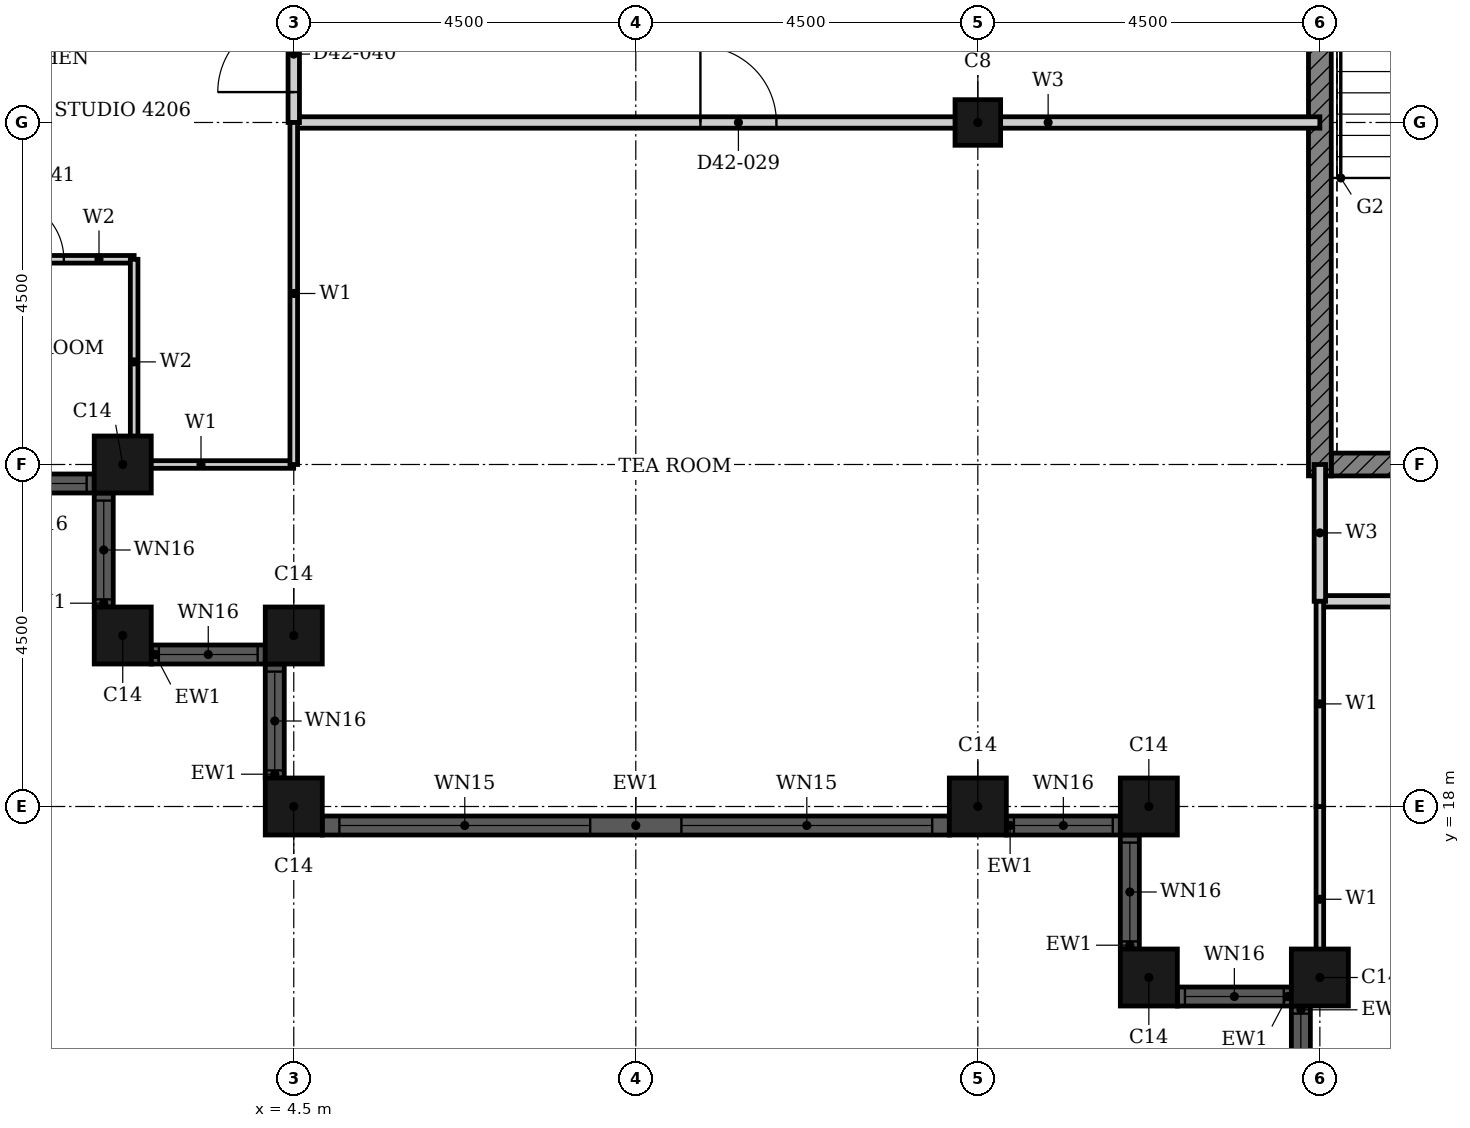
"""IFC4 building model, lengths in metres.
Left out: names, types, materials, properties, quantities, classifications, styles, units other than length and angle.
Written with IfcOpenShell. Run it as: python <this file> out.ifc"""

import sys

from ifc_helpers import new_model, si_unit, direction, frame, frame_2d, origin, origin_2d, place, context, subcontext, project, spatial, rectangle, hollow_rectangle, extrude, element, fill, save


model = new_model("IFC4")
c1 = context("Model", 3, precision=1e-05, world=origin(), true_north=direction((0.0, 1.0)))
c2 = subcontext(c1, "Body", "Model", "MODEL_VIEW")
j1 = project(units=[si_unit("LENGTHUNIT", "METRE"), si_unit("PLANEANGLEUNIT", "RADIAN")], contexts=[c1])
p1 = place(None, origin())
s1 = spatial("IfcSite", under=j1, at=p1, CompositionType="ELEMENT")
p2 = place(p1, origin())
s2 = spatial("IfcBuilding", under=s1, at=p2, CompositionType="ELEMENT")
p3 = place(p2, frame((0.0, 0.0, 169.1)))
s3 = spatial("IfcBuildingStorey", under=s2, at=p3, CompositionType="ELEMENT", Elevation=169.1)
for number, where, z_axis, x_axis in (
    (1, (2.25, 22.5, 0.0), (0.0, 0.0, 1.0), (1.0, 0.0, 0.0)),
    (2, (2.25, 20.25, 0.0), (0.0, 0.0, 1.0), (1.0, 0.0, 0.0)),
    (3, (4.5, 20.25, 0.0), (0.0, 0.0, 1.0), (1.0, 0.0, 0.0)),
    (4, (4.5, 18.0, 0.0), (0.0, 0.0, 1.0), (1.0, 0.0, 0.0)),
    (5, (13.5, 18.0, 0.0), (0.0, 0.0, 1.0), (1.0, 0.0, 0.0)),
    (6, (15.75, 18.0, 0.0), (0.0, 0.0, 1.0), (1.0, 0.0, 0.0)),
    (7, (15.75, 15.75, 0.0), (0.0, 0.0, 1.0), (1.0, 0.0, 0.0)),
    (8, (18.0, 15.75, 0.0), (0.0, 0.0, 1.0), (1.0, 0.0, 0.0)),
):
    element("IfcColumn", number, at=place(p3, frame(where, z_axis=z_axis, x_axis=x_axis)), inside=s3, PredefinedType="COLUMN", context=c2, shape_type="SweptSolid", body=[
        extrude(hollow_rectangle(XDim=0.75, YDim=0.75, WallThickness=0.024, at=origin_2d()), origin(), (0.0, 0.0, 1.0), 3.7),
    ])
p4 = place(p3, frame((13.5, 27.0, 0.0), z_axis=(0.0, 0.0, 1.0), x_axis=(1.0, 0.0, 0.0)))
e9 = element("IfcColumn", 9, at=p4, inside=s3, PredefinedType="COLUMN", context=c2, shape_type="SweptSolid", body=[
    extrude(hollow_rectangle(XDim=0.6, YDim=0.6, WallThickness=0.02, at=origin_2d()), origin(), (0.0, 0.0, 1.0), 3.7),
])
p5 = place(p3, frame((0.375, 22.25, 0.0), z_axis=(0.0, 0.0, 1.0), x_axis=(1.0, 0.0, 0.0)))
e10 = element("IfcWall", 10, at=p5, inside=s3, PredefinedType="SOLIDWALL", context=c2, shape_type="SweptSolid", body=[
    extrude(rectangle(XDim=1.5, YDim=0.25, at=frame_2d((0.75, 0.0))), origin(), (0.0, 0.0, 1.0), 3.7),
])
p6 = place(p5, frame((0.1, 0.0, 0.9)))
e11 = element("IfcOpeningElement", 11, at=p6, cuts=e10, PredefinedType="OPENING", context=c2, shape_type="SweptSolid", body=[
    extrude(rectangle(XDim=1.3, YDim=1.85, at=frame_2d((0.65, 0.925))), frame((0.0, 0.135, 0.0), z_axis=(0.0, -1.0, 0.0), x_axis=(1.0, 0.0, 0.0)), (0.0, 0.0, 1.0), 0.27),
])
p7 = place(p3, frame((2.0, 22.125, 0.0), z_axis=(0.0, 0.0, 1.0), x_axis=(0.0, -1.0, 0.0)))
e12 = element("IfcWall", 12, at=p7, inside=s3, PredefinedType="SOLIDWALL", context=c2, shape_type="SweptSolid", body=[
    extrude(rectangle(XDim=1.5, YDim=0.25, at=frame_2d((0.75, 0.0))), origin(), (0.0, 0.0, 1.0), 3.7),
])
p8 = place(p7, frame((0.1, 0.0, 0.9)))
e13 = element("IfcOpeningElement", 13, at=p8, cuts=e12, PredefinedType="OPENING", context=c2, shape_type="SweptSolid", body=[
    extrude(rectangle(XDim=1.3, YDim=1.85, at=frame_2d((0.65, 0.925))), frame((0.0, 0.135, 0.0), z_axis=(0.0, -1.0, 0.0), x_axis=(1.0, 0.0, 0.0)), (0.0, 0.0, 1.0), 0.27),
])
p9 = place(p3, frame((2.625, 20.0, 0.0), z_axis=(0.0, 0.0, 1.0), x_axis=(1.0, 0.0, 0.0)))
e14 = element("IfcWall", 14, at=p9, inside=s3, PredefinedType="SOLIDWALL", context=c2, shape_type="SweptSolid", body=[
    extrude(rectangle(XDim=1.5, YDim=0.25, at=frame_2d((0.75, 0.0))), origin(), (0.0, 0.0, 1.0), 3.7),
])
p10 = place(p9, frame((0.1, 0.0, 0.9)))
e15 = element("IfcOpeningElement", 15, at=p10, cuts=e14, PredefinedType="OPENING", context=c2, shape_type="SweptSolid", body=[
    extrude(rectangle(XDim=1.3, YDim=1.85, at=frame_2d((0.65, 0.925))), frame((0.0, 0.135, 0.0), z_axis=(0.0, -1.0, 0.0), x_axis=(1.0, 0.0, 0.0)), (0.0, 0.0, 1.0), 0.27),
])
p11 = place(p3, frame((4.25, 19.875, 0.0), z_axis=(0.0, 0.0, 1.0), x_axis=(0.0, -1.0, 0.0)))
e16 = element("IfcWall", 16, at=p11, inside=s3, PredefinedType="SOLIDWALL", context=c2, shape_type="SweptSolid", body=[
    extrude(rectangle(XDim=1.5, YDim=0.25, at=frame_2d((0.75, 0.0))), origin(), (0.0, 0.0, 1.0), 3.7),
])
p12 = place(p11, frame((0.1, 0.0, 0.9)))
e17 = element("IfcOpeningElement", 17, at=p12, cuts=e16, PredefinedType="OPENING", context=c2, shape_type="SweptSolid", body=[
    extrude(rectangle(XDim=1.3, YDim=1.85, at=frame_2d((0.65, 0.925))), frame((0.0, 0.135, 0.0), z_axis=(0.0, -1.0, 0.0), x_axis=(1.0, 0.0, 0.0)), (0.0, 0.0, 1.0), 0.27),
])
p13 = place(p3, frame((4.875, 17.75, 0.0), z_axis=(0.0, 0.0, 1.0), x_axis=(1.0, 0.0, 0.0)))
e18 = element("IfcWall", 18, at=p13, inside=s3, PredefinedType="SOLIDWALL", context=c2, shape_type="SweptSolid", body=[
    extrude(rectangle(XDim=8.25, YDim=0.25, at=frame_2d((4.125, 0.0))), origin(), (0.0, 0.0, 1.0), 3.7),
])
p14 = place(p13, frame((0.225, 0.0, 0.45)))
e19 = element("IfcOpeningElement", 19, at=p14, cuts=e18, PredefinedType="OPENING", context=c2, shape_type="SweptSolid", body=[
    extrude(rectangle(XDim=3.3, YDim=2.3, at=frame_2d((1.65, 1.15))), frame((0.0, 0.135, 0.0), z_axis=(0.0, -1.0, 0.0), x_axis=(1.0, 0.0, 0.0)), (0.0, 0.0, 1.0), 0.27),
])
p15 = place(p13, frame((4.725, 0.0, 0.45)))
e20 = element("IfcOpeningElement", 20, at=p15, cuts=e18, PredefinedType="OPENING", context=c2, shape_type="SweptSolid", body=[
    extrude(rectangle(XDim=3.3, YDim=2.3, at=frame_2d((1.65, 1.15))), frame((0.0, 0.135, 0.0), z_axis=(0.0, -1.0, 0.0), x_axis=(1.0, 0.0, 0.0)), (0.0, 0.0, 1.0), 0.27),
])
p16 = place(p3, frame((13.875, 17.75, 0.0), z_axis=(0.0, 0.0, 1.0), x_axis=(1.0, 0.0, 0.0)))
e21 = element("IfcWall", 21, at=p16, inside=s3, PredefinedType="SOLIDWALL", context=c2, shape_type="SweptSolid", body=[
    extrude(rectangle(XDim=1.5, YDim=0.25, at=frame_2d((0.75, 0.0))), origin(), (0.0, 0.0, 1.0), 3.7),
])
p17 = place(p16, frame((0.1, 0.0, 0.9)))
e22 = element("IfcOpeningElement", 22, at=p17, cuts=e21, PredefinedType="OPENING", context=c2, shape_type="SweptSolid", body=[
    extrude(rectangle(XDim=1.3, YDim=1.85, at=frame_2d((0.65, 0.925))), frame((0.0, 0.135, 0.0), z_axis=(0.0, -1.0, 0.0), x_axis=(1.0, 0.0, 0.0)), (0.0, 0.0, 1.0), 0.27),
])
p18 = place(p3, frame((15.5, 17.625, 0.0), z_axis=(0.0, 0.0, 1.0), x_axis=(0.0, -1.0, 0.0)))
e23 = element("IfcWall", 23, at=p18, inside=s3, PredefinedType="SOLIDWALL", context=c2, shape_type="SweptSolid", body=[
    extrude(rectangle(XDim=1.5, YDim=0.25, at=frame_2d((0.75, 0.0))), origin(), (0.0, 0.0, 1.0), 3.7),
])
p19 = place(p18, frame((0.1, 0.0, 0.9)))
e24 = element("IfcOpeningElement", 24, at=p19, cuts=e23, PredefinedType="OPENING", context=c2, shape_type="SweptSolid", body=[
    extrude(rectangle(XDim=1.3, YDim=1.85, at=frame_2d((0.65, 0.925))), frame((0.0, 0.135, 0.0), z_axis=(0.0, -1.0, 0.0), x_axis=(1.0, 0.0, 0.0)), (0.0, 0.0, 1.0), 0.27),
])
p20 = place(p3, frame((16.125, 15.5, 0.0), z_axis=(0.0, 0.0, 1.0), x_axis=(1.0, 0.0, 0.0)))
e25 = element("IfcWall", 25, at=p20, inside=s3, PredefinedType="SOLIDWALL", context=c2, shape_type="SweptSolid", body=[
    extrude(rectangle(XDim=1.5, YDim=0.25, at=frame_2d((0.75, 0.0))), origin(), (0.0, 0.0, 1.0), 3.7),
])
p21 = place(p20, frame((0.1, 0.0, 0.9)))
e26 = element("IfcOpeningElement", 26, at=p21, cuts=e25, PredefinedType="OPENING", context=c2, shape_type="SweptSolid", body=[
    extrude(rectangle(XDim=1.3, YDim=1.85, at=frame_2d((0.65, 0.925))), frame((0.0, 0.135, 0.0), z_axis=(0.0, -1.0, 0.0), x_axis=(1.0, 0.0, 0.0)), (0.0, 0.0, 1.0), 0.27),
])
p22 = place(p3, frame((17.75, 15.375, 0.0), z_axis=(0.0, 0.0, 1.0), x_axis=(0.0, -1.0, 0.0)))
e27 = element("IfcWall", 27, at=p22, inside=s3, PredefinedType="SOLIDWALL", context=c2, shape_type="SweptSolid", body=[
    extrude(rectangle(XDim=1.5, YDim=0.25, at=frame_2d((0.75, 0.0))), origin(), (0.0, 0.0, 1.0), 3.7),
])
p23 = place(p22, frame((0.1, 0.0, 0.9)))
e28 = element("IfcOpeningElement", 28, at=p23, cuts=e27, PredefinedType="OPENING", context=c2, shape_type="SweptSolid", body=[
    extrude(rectangle(XDim=1.3, YDim=1.85, at=frame_2d((0.65, 0.925))), frame((0.0, 0.135, 0.0), z_axis=(0.0, -1.0, 0.0), x_axis=(1.0, 0.0, 0.0)), (0.0, 0.0, 1.0), 0.27),
])
p24 = place(p3, frame((18.15, 22.5, 0.0), z_axis=(0.0, 0.0, 1.0), x_axis=(1.0, 0.0, 0.0)))
e29 = element("IfcWall", 29, at=p24, inside=s3, PredefinedType="SHEAR", context=c2, shape_type="SweptSolid", body=[
    extrude(rectangle(XDim=4.225, YDim=0.3, at=frame_2d((2.113, 0.0))), origin(), (0.0, 0.0, 1.0), 3.4),
])
p25 = place(p3, frame((18.0, 22.35, 0.0), z_axis=(0.0, 0.0, 1.0), x_axis=(0.0, 1.0, 0.0)))
e30 = element("IfcWall", 30, at=p25, inside=s3, PredefinedType="SHEAR", context=c2, shape_type="SweptSolid", body=[
    extrude(rectangle(XDim=9.3, YDim=0.3, at=frame_2d((4.65, 0.0))), origin(), (0.0, 0.0, 1.0), 3.4),
])
p26 = place(p3, frame((18.0, 20.7, 0.0), z_axis=(0.0, 0.0, 1.0), x_axis=(1.0, 0.0, 0.0)))
e31 = element("IfcWall", 31, at=p26, inside=s3, PredefinedType="PARTITIONING", context=c2, shape_type="SweptSolid", body=[
    extrude(rectangle(XDim=13.5, YDim=0.15, at=frame_2d((6.75, 0.0))), origin(), (0.0, 0.0, 1.0), 3.4),
])
p27 = place(p26, frame((6.25, 0.0, 0.0)))
e32 = element("IfcOpeningElement", 32, at=p27, cuts=e31, PredefinedType="OPENING", context=c2, shape_type="SweptSolid", body=[
    extrude(rectangle(XDim=1.0, YDim=2.1, at=frame_2d((0.5, 1.05))), frame((0.0, 0.085, 0.0), z_axis=(0.0, -1.0, 0.0), x_axis=(1.0, 0.0, 0.0)), (0.0, 0.0, 1.0), 0.17),
])
p28 = place(p3, frame((4.5, 27.0, 0.0), z_axis=(0.0, 0.0, 1.0), x_axis=(1.0, 0.0, 0.0)))
e33 = element("IfcWall", 33, at=p28, inside=s3, PredefinedType="PARTITIONING", context=c2, shape_type="SweptSolid", body=[
    extrude(rectangle(XDim=13.5, YDim=0.15, at=frame_2d((6.75, 0.0))), origin(), (0.0, 0.0, 1.0), 2.68),
])
p29 = place(p28, frame((5.35, 0.0, 0.0)))
e34 = element("IfcOpeningElement", 34, at=p29, cuts=e33, PredefinedType="OPENING", context=c2, shape_type="SweptSolid", body=[
    extrude(rectangle(XDim=1.0, YDim=2.1, at=frame_2d((0.5, 1.05))), frame((0.0, 0.085, 0.0), z_axis=(0.0, -1.0, 0.0), x_axis=(1.0, 0.0, 0.0)), (0.0, 0.0, 1.0), 0.17),
])
p30 = place(p3, frame((18.0, 20.7, 0.0), z_axis=(0.0, 0.0, 1.0), x_axis=(0.0, 1.0, 0.0)))
e35 = element("IfcWall", 35, at=p30, inside=s3, PredefinedType="PARTITIONING", context=c2, shape_type="SweptSolid", body=[
    extrude(rectangle(XDim=1.8, YDim=0.15, at=frame_2d((0.9, 0.0))), origin(), (0.0, 0.0, 1.0), 3.4),
])
p31 = place(p3, frame((4.5, 27.0, 0.0), z_axis=(0.0, 0.0, 1.0), x_axis=(0.0, 1.0, 0.0)))
e36 = element("IfcWall", 36, at=p31, inside=s3, PredefinedType="PARTITIONING", context=c2, shape_type="SweptSolid", body=[
    extrude(rectangle(XDim=1.8, YDim=0.15, at=frame_2d((0.9, 0.0))), origin(), (0.0, 0.0, 1.0), 3.4),
])
p32 = place(p31, frame((0.4, 0.0, 0.0)))
e37 = element("IfcOpeningElement", 37, at=p32, cuts=e36, PredefinedType="OPENING", context=c2, shape_type="SweptSolid", body=[
    extrude(rectangle(XDim=1.0, YDim=2.2, at=frame_2d((0.5, 1.1))), frame((0.0, 0.085, 0.0), z_axis=(0.0, -1.0, 0.0), x_axis=(1.0, 0.0, 0.0)), (0.0, 0.0, 1.0), 0.17),
])
p33 = place(p3, frame((2.06, 22.5, 0.0), z_axis=(0.0, 0.0, 1.0), x_axis=(1.0, 0.0, 0.0)))
e38 = element("IfcWall", 38, at=p33, inside=s3, PredefinedType="PARTITIONING", context=c2, shape_type="SweptSolid", body=[
    extrude(rectangle(XDim=2.439, YDim=0.1, at=frame_2d((1.219, 0.0))), origin(), (0.0, 0.0, 1.0), 2.68),
])
p34 = place(p3, frame((18.0, 15.56, 0.0), z_axis=(0.0, 0.0, 1.0), x_axis=(0.0, 1.0, 0.0)))
e39 = element("IfcWall", 39, at=p34, inside=s3, PredefinedType="PARTITIONING", context=c2, shape_type="SweptSolid", body=[
    extrude(rectangle(XDim=2.439, YDim=0.1, at=frame_2d((1.219, 0.0))), origin(), (0.0, 0.0, 1.0), 3.4),
])
p35 = place(p3, frame((18.0, 18.0, 0.0), z_axis=(0.0, 0.0, 1.0), x_axis=(0.0, 1.0, 0.0)))
e40 = element("IfcWall", 40, at=p35, inside=s3, PredefinedType="PARTITIONING", context=c2, shape_type="SweptSolid", body=[
    extrude(rectangle(XDim=2.7, YDim=0.1, at=frame_2d((1.35, 0.0))), origin(), (0.0, 0.0, 1.0), 3.4),
])
p36 = place(p3, frame((4.5, 22.5, 0.0), z_axis=(0.0, 0.0, 1.0), x_axis=(0.0, 1.0, 0.0)))
e41 = element("IfcWall", 41, at=p36, inside=s3, PredefinedType="PARTITIONING", context=c2, shape_type="SweptSolid", body=[
    extrude(rectangle(XDim=4.5, YDim=0.1, at=frame_2d((2.25, 0.0))), origin(), (0.0, 0.0, 1.0), 3.4),
])
p37 = place(p3, frame((-0.125, 25.2, 0.0), z_axis=(0.0, 0.0, 1.0), x_axis=(1.0, 0.0, 0.0)))
e42 = element("IfcWall", 42, at=p37, inside=s3, PredefinedType="PARTITIONING", context=c2, shape_type="SweptSolid", body=[
    extrude(rectangle(XDim=2.525, YDim=0.1, at=frame_2d((1.262, 0.0))), origin(), (0.0, 0.0, 1.0), 3.4),
])
p38 = place(p37, frame((0.8, 0.0, 0.0)))
e43 = element("IfcOpeningElement", 43, at=p38, cuts=e42, PredefinedType="OPENING", context=c2, shape_type="SweptSolid", body=[
    extrude(rectangle(XDim=0.8, YDim=2.1, at=frame_2d((0.4, 1.05))), frame((0.0, 0.06, 0.0), z_axis=(0.0, -1.0, 0.0), x_axis=(1.0, 0.0, 0.0)), (0.0, 0.0, 1.0), 0.12),
])
p39 = place(p3, frame((2.4, 22.5, 0.0), z_axis=(0.0, 0.0, 1.0), x_axis=(0.0, 1.0, 0.0)))
e44 = element("IfcWall", 44, at=p39, inside=s3, PredefinedType="PARTITIONING", context=c2, shape_type="SweptSolid", body=[
    extrude(rectangle(XDim=2.7, YDim=0.1, at=frame_2d((1.35, 0.0))), origin(), (0.0, 0.0, 1.0), 3.4),
])
p40 = place(p6, origin())
e45 = element("IfcWindow", 45, at=p40, inside=s3, PartitioningType="SINGLE_PANEL", PredefinedType="WINDOW", context=c2, shape_type="SweptSolid", body=[
    extrude(rectangle(XDim=1.3, YDim=1.85, at=frame_2d((0.65, 0.925))), frame((0.0, 0.03, 0.0), z_axis=(0.0, -1.0, 0.0), x_axis=(1.0, 0.0, 0.0)), (0.0, 0.0, 1.0), 0.06),
])
fill(e11, e45)
p41 = place(p8, origin())
e46 = element("IfcWindow", 46, at=p41, inside=s3, PartitioningType="SINGLE_PANEL", PredefinedType="WINDOW", context=c2, shape_type="SweptSolid", body=[
    extrude(rectangle(XDim=1.3, YDim=1.85, at=frame_2d((0.65, 0.925))), frame((0.0, 0.03, 0.0), z_axis=(0.0, -1.0, 0.0), x_axis=(1.0, 0.0, 0.0)), (0.0, 0.0, 1.0), 0.06),
])
fill(e13, e46)
p42 = place(p10, origin())
e47 = element("IfcWindow", 47, at=p42, inside=s3, PartitioningType="SINGLE_PANEL", PredefinedType="WINDOW", context=c2, shape_type="SweptSolid", body=[
    extrude(rectangle(XDim=1.3, YDim=1.85, at=frame_2d((0.65, 0.925))), frame((0.0, 0.03, 0.0), z_axis=(0.0, -1.0, 0.0), x_axis=(1.0, 0.0, 0.0)), (0.0, 0.0, 1.0), 0.06),
])
fill(e15, e47)
p43 = place(p12, origin())
e48 = element("IfcWindow", 48, at=p43, inside=s3, PartitioningType="SINGLE_PANEL", PredefinedType="WINDOW", context=c2, shape_type="SweptSolid", body=[
    extrude(rectangle(XDim=1.3, YDim=1.85, at=frame_2d((0.65, 0.925))), frame((0.0, 0.03, 0.0), z_axis=(0.0, -1.0, 0.0), x_axis=(1.0, 0.0, 0.0)), (0.0, 0.0, 1.0), 0.06),
])
fill(e17, e48)
p44 = place(p14, origin())
e49 = element("IfcWindow", 49, at=p44, inside=s3, PartitioningType="SINGLE_PANEL", PredefinedType="WINDOW", context=c2, shape_type="SweptSolid", body=[
    extrude(rectangle(XDim=3.3, YDim=2.3, at=frame_2d((1.65, 1.15))), frame((0.0, 0.03, 0.0), z_axis=(0.0, -1.0, 0.0), x_axis=(1.0, 0.0, 0.0)), (0.0, 0.0, 1.0), 0.06),
])
fill(e19, e49)
p45 = place(p15, origin())
e50 = element("IfcWindow", 50, at=p45, inside=s3, PartitioningType="SINGLE_PANEL", PredefinedType="WINDOW", context=c2, shape_type="SweptSolid", body=[
    extrude(rectangle(XDim=3.3, YDim=2.3, at=frame_2d((1.65, 1.15))), frame((0.0, 0.03, 0.0), z_axis=(0.0, -1.0, 0.0), x_axis=(1.0, 0.0, 0.0)), (0.0, 0.0, 1.0), 0.06),
])
fill(e20, e50)
p46 = place(p17, origin())
e51 = element("IfcWindow", 51, at=p46, inside=s3, PartitioningType="SINGLE_PANEL", PredefinedType="WINDOW", context=c2, shape_type="SweptSolid", body=[
    extrude(rectangle(XDim=1.3, YDim=1.85, at=frame_2d((0.65, 0.925))), frame((0.0, 0.03, 0.0), z_axis=(0.0, -1.0, 0.0), x_axis=(1.0, 0.0, 0.0)), (0.0, 0.0, 1.0), 0.06),
])
fill(e22, e51)
p47 = place(p19, origin())
e52 = element("IfcWindow", 52, at=p47, inside=s3, PartitioningType="SINGLE_PANEL", PredefinedType="WINDOW", context=c2, shape_type="SweptSolid", body=[
    extrude(rectangle(XDim=1.3, YDim=1.85, at=frame_2d((0.65, 0.925))), frame((0.0, 0.03, 0.0), z_axis=(0.0, -1.0, 0.0), x_axis=(1.0, 0.0, 0.0)), (0.0, 0.0, 1.0), 0.06),
])
fill(e24, e52)
p48 = place(p21, origin())
e53 = element("IfcWindow", 53, at=p48, inside=s3, PartitioningType="SINGLE_PANEL", PredefinedType="WINDOW", context=c2, shape_type="SweptSolid", body=[
    extrude(rectangle(XDim=1.3, YDim=1.85, at=frame_2d((0.65, 0.925))), frame((0.0, 0.03, 0.0), z_axis=(0.0, -1.0, 0.0), x_axis=(1.0, 0.0, 0.0)), (0.0, 0.0, 1.0), 0.06),
])
fill(e26, e53)
p49 = place(p23, origin())
e54 = element("IfcWindow", 54, at=p49, inside=s3, PartitioningType="SINGLE_PANEL", PredefinedType="WINDOW", context=c2, shape_type="SweptSolid", body=[
    extrude(rectangle(XDim=1.3, YDim=1.85, at=frame_2d((0.65, 0.925))), frame((0.0, 0.03, 0.0), z_axis=(0.0, -1.0, 0.0), x_axis=(1.0, 0.0, 0.0)), (0.0, 0.0, 1.0), 0.06),
])
fill(e28, e54)
p50 = place(p29, origin())
e55 = element("IfcDoor", 55, at=p50, inside=s3, OperationType="SINGLE_SWING_LEFT", PredefinedType="DOOR", context=c2, shape_type="SweptSolid", body=[
    extrude(rectangle(XDim=1.0, YDim=2.1, at=frame_2d((0.5, 1.05))), frame((0.0, 0.025, 0.0), z_axis=(0.0, -1.0, 0.0), x_axis=(1.0, 0.0, 0.0)), (0.0, 0.0, 1.0), 0.05),
])
fill(e34, e55)
p51 = place(p32, origin())
e56 = element("IfcDoor", 56, at=p51, inside=s3, OperationType="SINGLE_SWING_RIGHT", PredefinedType="DOOR", context=c2, shape_type="SweptSolid", body=[
    extrude(rectangle(XDim=1.0, YDim=2.2, at=frame_2d((0.5, 1.1))), frame((0.0, 0.025, 0.0), z_axis=(0.0, -1.0, 0.0), x_axis=(1.0, 0.0, 0.0)), (0.0, 0.0, 1.0), 0.05),
])
fill(e37, e56)
p52 = place(p38, origin())
e57 = element("IfcDoor", 57, at=p52, inside=s3, OperationType="SINGLE_SWING_RIGHT", PredefinedType="DOOR", context=c2, shape_type="SweptSolid", body=[
    extrude(rectangle(XDim=0.8, YDim=2.1, at=frame_2d((0.4, 1.05))), frame((0.0, 0.025, 0.0), z_axis=(0.0, -1.0, 0.0), x_axis=(1.0, 0.0, 0.0)), (0.0, 0.0, 1.0), 0.05),
])
fill(e43, e57)
save(model, sys.argv[1])
